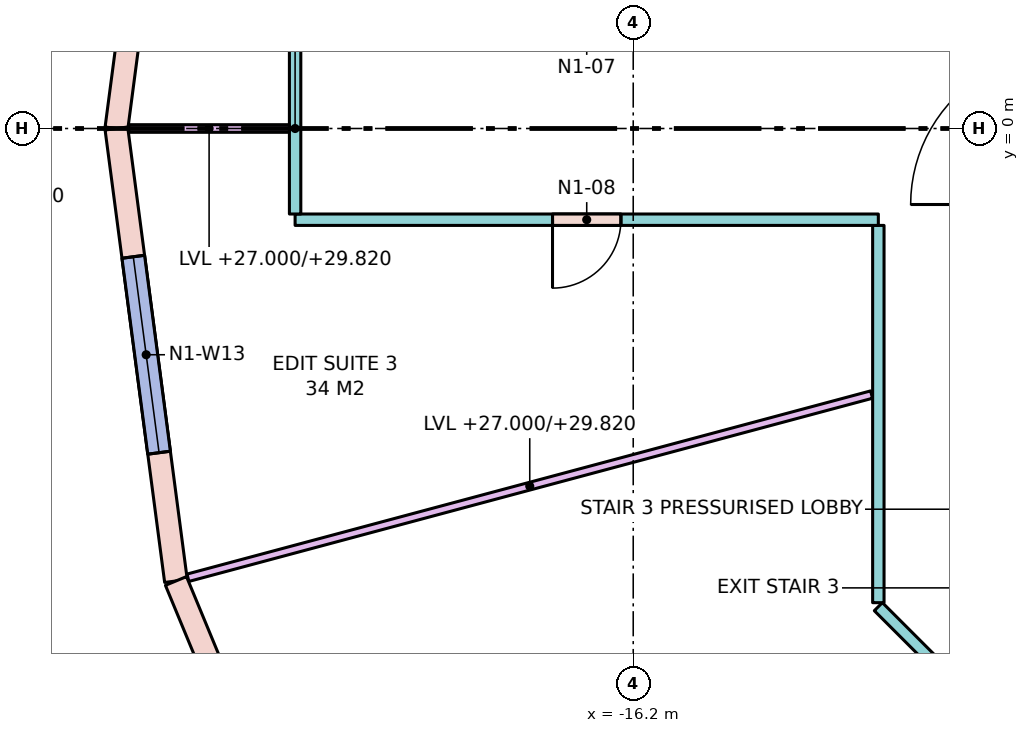
"""IFC4 building model, lengths in metres.
Left out: names, types, materials, properties, quantities, classifications, styles, units other than length and angle.
Written with IfcOpenShell. Run it as: python <this file> out.ifc"""

import sys

from ifc_helpers import new_model, si_unit, direction, frame, frame_2d, origin, place, context, subcontext, project, spatial, rectangle, extrude, element, fill, save


model = new_model("IFC4")
c1 = context("Model", 3, precision=1e-05, world=origin(), true_north=direction((0.0, 1.0)))
c2 = subcontext(c1, "Body", "Model", "MODEL_VIEW")
j1 = project(units=[si_unit("LENGTHUNIT", "METRE"), si_unit("PLANEANGLEUNIT", "RADIAN")], contexts=[c1])
p1 = place(None, origin())
s1 = spatial("IfcSite", under=j1, at=p1, CompositionType="ELEMENT")
p2 = place(p1, origin())
s2 = spatial("IfcBuilding", under=s1, at=p2, CompositionType="ELEMENT")
p3 = place(p2, frame((0.0, 0.0, 27.0)))
s3 = spatial("IfcBuildingStorey", under=s2, at=p3, CompositionType="ELEMENT", Elevation=27.0)
p4 = place(p3, frame((-22.216, 5.953, 0.0), z_axis=(0.0, 0.0, 1.0), x_axis=(-0.130522880875, -0.991445297315, 0.0)))
e1 = element("IfcWall", 1, at=p4, inside=s3, PredefinedType="STANDARD", context=c2, shape_type="SweptSolid", body=[
    extrude(rectangle(XDim=6.004, YDim=0.3, at=frame_2d((3.002, 0.0))), origin(), (0.0, 0.0, 1.0), 3.72),
])
p5 = place(p4, frame((1.677, 0.0, 0.0)))
e2 = element("IfcOpeningElement", 2, at=p5, cuts=e1, PredefinedType="OPENING", context=c2, shape_type="SweptSolid", body=[
    extrude(rectangle(XDim=1.0, YDim=2.4, at=frame_2d((0.5, 1.2))), frame((0.0, 0.16, 0.0), z_axis=(0.0, -1.0, 0.0), x_axis=(1.0, 0.0, 0.0)), (0.0, 0.0, 1.0), 0.32),
])
p6 = place(p4, frame((2.827, 0.0, 0.8)))
e3 = element("IfcOpeningElement", 3, at=p6, cuts=e1, PredefinedType="OPENING", context=c2, shape_type="SweptSolid", body=[
    extrude(rectangle(XDim=1.5, YDim=2.7, at=frame_2d((0.75, 1.35))), frame((0.0, 0.16, 0.0), z_axis=(0.0, -1.0, 0.0), x_axis=(1.0, 0.0, 0.0)), (0.0, 0.0, 1.0), 0.32),
])
p7 = place(p3, frame((-23.0, 0.0, 0.0), z_axis=(0.0, 0.0, 1.0), x_axis=(0.130522880875, -0.991445297315, 0.0)))
e4 = element("IfcWall", 4, at=p7, inside=s3, PredefinedType="STANDARD", context=c2, shape_type="SweptSolid", body=[
    extrude(rectangle(XDim=6.004, YDim=0.3, at=frame_2d((3.002, 0.0))), origin(), (0.0, 0.0, 1.0), 3.72),
])
p8 = place(p7, frame((1.702, 0.0, 0.8)))
e5 = element("IfcOpeningElement", 5, at=p8, cuts=e4, PredefinedType="OPENING", context=c2, shape_type="SweptSolid", body=[
    extrude(rectangle(XDim=2.6, YDim=2.7, at=frame_2d((1.3, 1.35))), frame((0.0, 0.16, 0.0), z_axis=(0.0, -1.0, 0.0), x_axis=(1.0, 0.0, 0.0)), (0.0, 0.0, 1.0), 0.32),
])
p9 = place(p3, frame((-22.216, -5.953, 0.0), z_axis=(0.0, 0.0, 1.0), x_axis=(0.382671411433, -0.923884511653, 0.0)))
e6 = element("IfcWall", 6, at=p9, inside=s3, PredefinedType="STANDARD", context=c2, shape_type="SweptSolid", body=[
    extrude(rectangle(XDim=6.004, YDim=0.3, at=frame_2d((3.002, 0.0))), origin(), (0.0, 0.0, 1.0), 3.72),
])
p10 = place(p9, frame((1.677, 0.0, 0.0)))
e7 = element("IfcOpeningElement", 7, at=p10, cuts=e6, PredefinedType="OPENING", context=c2, shape_type="SweptSolid", body=[
    extrude(rectangle(XDim=1.0, YDim=2.4, at=frame_2d((0.5, 1.2))), frame((0.0, 0.16, 0.0), z_axis=(0.0, -1.0, 0.0), x_axis=(1.0, 0.0, 0.0)), (0.0, 0.0, 1.0), 0.32),
])
p11 = place(p9, frame((2.827, 0.0, 0.8)))
e8 = element("IfcOpeningElement", 8, at=p11, cuts=e6, PredefinedType="OPENING", context=c2, shape_type="SweptSolid", body=[
    extrude(rectangle(XDim=1.5, YDim=2.7, at=frame_2d((0.75, 1.35))), frame((0.0, 0.16, 0.0), z_axis=(0.0, -1.0, 0.0), x_axis=(1.0, 0.0, 0.0)), (0.0, 0.0, 1.0), 0.32),
])
p12 = place(p3, frame((-8.328, -10.938, 0.0), z_axis=(0.0, 0.0, 1.0), x_axis=(-0.707125355289, 0.707088206597, 0.0)))
e9 = element("IfcWall", 9, at=p12, inside=s3, PredefinedType="PARTITIONING", context=c2, shape_type="SweptSolid", body=[
    extrude(rectangle(XDim=6.572, YDim=0.15, at=frame_2d((3.286, 0.0))), origin(), (0.0, 0.0, 1.0), 2.82),
])
p13 = place(p12, frame((2.386, 0.0, 0.0)))
e10 = element("IfcOpeningElement", 10, at=p13, cuts=e9, PredefinedType="OPENING", context=c2, shape_type="SweptSolid", body=[
    extrude(rectangle(XDim=1.8, YDim=2.1, at=frame_2d((0.9, 1.05))), frame((0.0, 0.085, 0.0), z_axis=(0.0, -1.0, 0.0), x_axis=(1.0, 0.0, 0.0)), (0.0, 0.0, 1.0), 0.17),
])
p14 = place(p3, frame((-12.975, -6.238, 0.0), z_axis=(0.0, 0.0, 1.0), x_axis=(0.0, 1.0, 0.0)))
e11 = element("IfcWall", 11, at=p14, inside=s3, PredefinedType="PARTITIONING", context=c2, shape_type="SweptSolid", body=[
    extrude(rectangle(XDim=4.963, YDim=0.15, at=frame_2d((2.482, 0.0))), origin(), (0.0, 0.0, 1.0), 2.82),
])
p15 = place(p3, frame((-12.975, -1.2, 0.0), z_axis=(0.0, 0.0, 1.0), x_axis=(-1.0, 0.0, 0.0)))
e12 = element("IfcWall", 12, at=p15, inside=s3, PredefinedType="PARTITIONING", context=c2, shape_type="SweptSolid", body=[
    extrude(rectangle(XDim=7.674, YDim=0.15, at=frame_2d((3.837, 0.0))), origin(), (0.0, 0.0, 1.0), 3.72),
])
p16 = place(p15, frame((3.387, 0.0, 0.0)))
e13 = element("IfcOpeningElement", 13, at=p16, cuts=e12, PredefinedType="OPENING", context=c2, shape_type="SweptSolid", body=[
    extrude(rectangle(XDim=0.9, YDim=2.1, at=frame_2d((0.45, 1.05))), frame((0.0, 0.085, 0.0), z_axis=(0.0, -1.0, 0.0), x_axis=(1.0, 0.0, 0.0)), (0.0, 0.0, 1.0), 0.17),
])
p17 = place(p3, frame((-20.649, -1.125, 0.0), z_axis=(0.0, 0.0, 1.0), x_axis=(0.0, 1.0, 0.0)))
e14 = element("IfcWall", 14, at=p17, inside=s3, PredefinedType="PARTITIONING", context=c2, shape_type="SweptSolid", body=[
    extrude(rectangle(XDim=2.25, YDim=0.15, at=frame_2d((1.125, 0.0))), origin(), (0.0, 0.0, 1.0), 2.82),
])
p18 = place(p3, frame((-20.724, 0.0, 0.0), z_axis=(0.0, 0.0, 1.0), x_axis=(-1.0, 0.0, 0.0)))
e15 = element("IfcWall", 15, at=p18, inside=s3, PredefinedType="PARTITIONING", context=c2, shape_type="SweptSolid", body=[
    extrude(rectangle(XDim=2.113, YDim=0.1, at=frame_2d((1.057, 0.0))), origin(), (0.0, 0.0, 1.0), 2.82),
])
p19 = place(p3, frame((-13.064, -3.5, 0.0), z_axis=(0.0, 0.0, 1.0), x_axis=(-0.965922655056, -0.258830880017, 0.0)))
e16 = element("IfcWall", 16, at=p19, inside=s3, PredefinedType="PARTITIONING", context=c2, shape_type="SweptSolid", body=[
    extrude(rectangle(XDim=9.312, YDim=0.1, at=frame_2d((4.656, 0.0))), origin(), (0.0, 0.0, 1.0), 2.82),
])
p20 = place(p8, origin())
e17 = element("IfcWindow", 17, at=p20, inside=s3, PartitioningType="SINGLE_PANEL", PredefinedType="WINDOW", context=c2, shape_type="SweptSolid", body=[
    extrude(rectangle(XDim=2.6, YDim=2.7, at=frame_2d((1.3, 1.35))), frame((0.0, 0.03, 0.0), z_axis=(0.0, -1.0, 0.0), x_axis=(1.0, 0.0, 0.0)), (0.0, 0.0, 1.0), 0.06),
])
fill(e5, e17)
p21 = place(p16, origin())
e18 = element("IfcDoor", 18, at=p21, inside=s3, OperationType="SINGLE_SWING_RIGHT", PredefinedType="DOOR", context=c2, shape_type="SweptSolid", body=[
    extrude(rectangle(XDim=0.9, YDim=2.1, at=frame_2d((0.45, 1.05))), frame((0.0, 0.025, 0.0), z_axis=(0.0, -1.0, 0.0), x_axis=(1.0, 0.0, 0.0)), (0.0, 0.0, 1.0), 0.05),
])
fill(e13, e18)
save(model, sys.argv[1])
